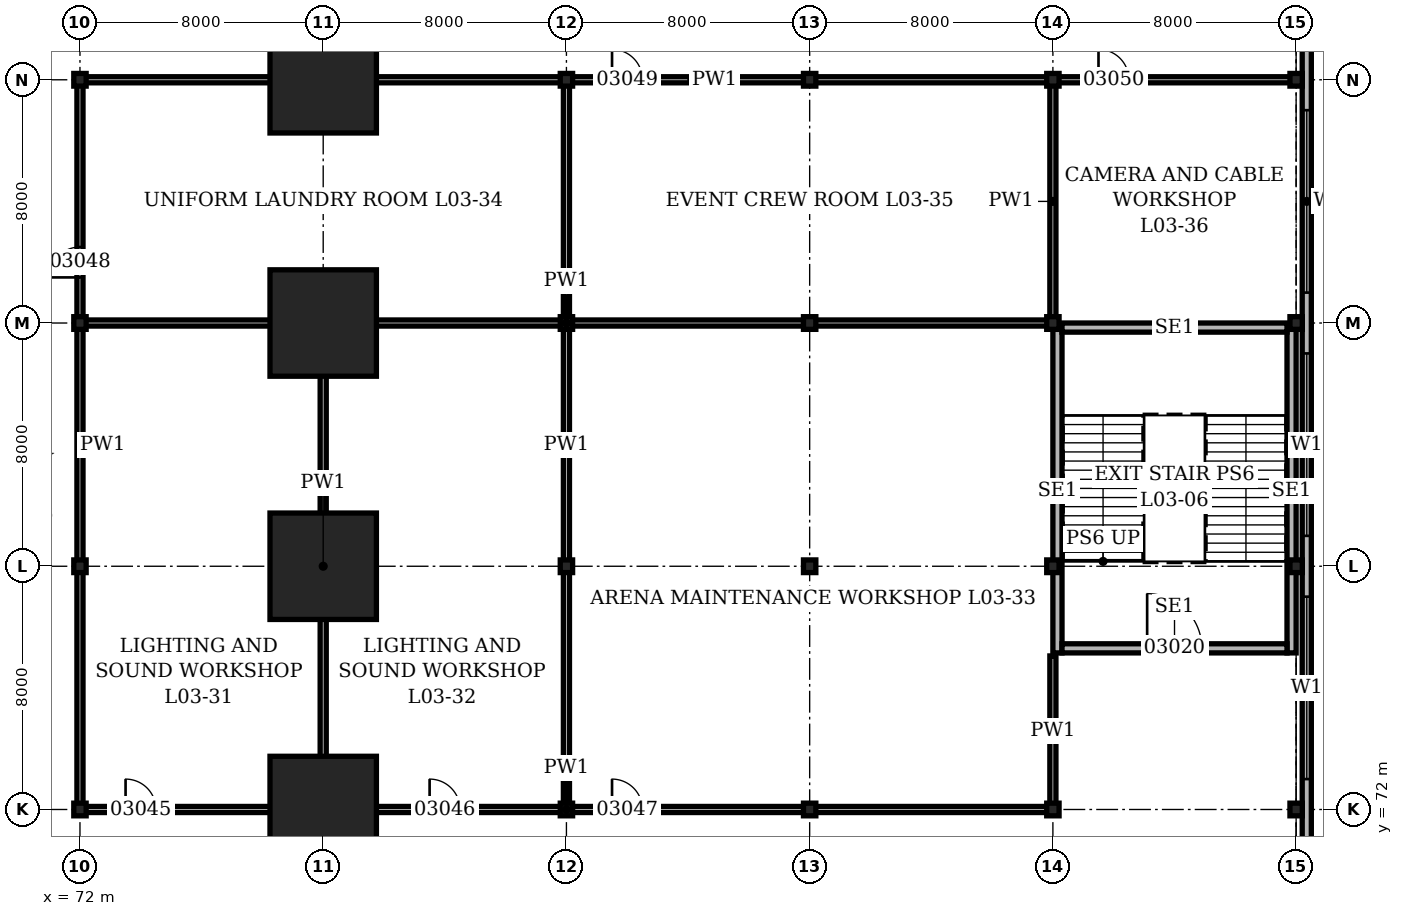
"""IFC4 building model, lengths in metres.
Left out: names, types, materials, properties, quantities, classifications, styles, units other than length and angle.
Written with IfcOpenShell. Run it as: python <this file> out.ifc"""

import sys

from ifc_helpers import new_model, si_unit, direction, frame, frame_2d, origin, origin_2d, place, context, subcontext, project, spatial, rectangle, hollow_rectangle, i_section, extrude, element, fill, save


model = new_model("IFC4")
c1 = context("Model", 3, precision=1e-05, world=origin(), true_north=direction((0.0, 1.0)))
c2 = subcontext(c1, "Body", "Model", "MODEL_VIEW")
j1 = project(units=[si_unit("LENGTHUNIT", "METRE"), si_unit("PLANEANGLEUNIT", "RADIAN")], contexts=[c1])
p1 = place(None, origin())
s1 = spatial("IfcSite", under=j1, at=p1, CompositionType="ELEMENT")
p2 = place(p1, origin())
s2 = spatial("IfcBuilding", under=s1, at=p2, CompositionType="ELEMENT")
p3 = place(p2, frame((0.0, 0.0, 14.9)))
s3 = spatial("IfcBuildingStorey", under=s2, at=p3, CompositionType="ELEMENT", Elevation=14.9)
for number, where, z_axis, x_axis in (
    (1, (72.0, 72.0, 0.0), (0.0, 0.0, 1.0), (1.0, 0.0, 0.0)),
    (2, (72.0, 80.0, 0.0), (0.0, 0.0, 1.0), (1.0, 0.0, 0.0)),
    (3, (72.0, 88.0, 0.0), (0.0, 0.0, 1.0), (1.0, 0.0, 0.0)),
    (4, (72.0, 96.0, 0.0), (0.0, 0.0, 1.0), (1.0, 0.0, 0.0)),
):
    element("IfcColumn", number, at=place(p3, frame(where, z_axis=z_axis, x_axis=x_axis)), inside=s3, PredefinedType="COLUMN", context=c2, shape_type="SweptSolid", body=[
        extrude(i_section(OverallWidth=0.406, OverallDepth=0.417, WebThickness=0.03, FlangeThickness=0.048, at=origin_2d()), origin(), (0.0, 0.0, 1.0), 5.0),
    ])
for number, where, z_axis, x_axis in (
    (5, (80.0, 72.0, 0.0), (0.0, 0.0, 1.0), (1.0, 0.0, 0.0)),
    (6, (80.0, 80.0, 0.0), (0.0, 0.0, 1.0), (1.0, 0.0, 0.0)),
    (7, (80.0, 88.0, 0.0), (0.0, 0.0, 1.0), (1.0, 0.0, 0.0)),
    (8, (80.0, 96.0, 0.0), (0.0, 0.0, 1.0), (1.0, 0.0, 0.0)),
):
    element("IfcColumn", number, at=place(p3, frame(where, z_axis=z_axis, x_axis=x_axis)), inside=s3, PredefinedType="COLUMN", context=c2, shape_type="SweptSolid", body=[
        extrude(hollow_rectangle(XDim=3.5, YDim=3.5, WallThickness=0.5, at=origin_2d()), origin(), (0.0, 0.0, 1.0), 5.0),
    ])
for number, where, z_axis, x_axis in (
    (9, (88.0, 72.0, 0.0), (0.0, 0.0, 1.0), (1.0, 0.0, 0.0)),
    (10, (88.0, 80.0, 0.0), (0.0, 0.0, 1.0), (1.0, 0.0, 0.0)),
    (11, (88.0, 88.0, 0.0), (0.0, 0.0, 1.0), (1.0, 0.0, 0.0)),
    (12, (88.0, 96.0, 0.0), (0.0, 0.0, 1.0), (1.0, 0.0, 0.0)),
    (13, (96.0, 72.0, 0.0), (0.0, 0.0, 1.0), (1.0, 0.0, 0.0)),
    (14, (96.0, 80.0, 0.0), (0.0, 0.0, 1.0), (1.0, 0.0, 0.0)),
    (15, (96.0, 88.0, 0.0), (0.0, 0.0, 1.0), (1.0, 0.0, 0.0)),
    (16, (96.0, 96.0, 0.0), (0.0, 0.0, 1.0), (1.0, 0.0, 0.0)),
    (17, (104.0, 72.0, 0.0), (0.0, 0.0, 1.0), (1.0, 0.0, 0.0)),
    (18, (104.0, 80.0, 0.0), (0.0, 0.0, 1.0), (1.0, 0.0, 0.0)),
    (19, (104.0, 88.0, 0.0), (0.0, 0.0, 1.0), (1.0, 0.0, 0.0)),
    (20, (104.0, 96.0, 0.0), (0.0, 0.0, 1.0), (1.0, 0.0, 0.0)),
    (21, (112.0, 72.0, 0.0), (0.0, 0.0, 1.0), (1.0, 0.0, 0.0)),
    (22, (112.0, 80.0, 0.0), (0.0, 0.0, 1.0), (1.0, 0.0, 0.0)),
    (23, (112.0, 88.0, 0.0), (0.0, 0.0, 1.0), (1.0, 0.0, 0.0)),
    (24, (112.0, 96.0, 0.0), (0.0, 0.0, 1.0), (1.0, 0.0, 0.0)),
):
    element("IfcColumn", number, at=place(p3, frame(where, z_axis=z_axis, x_axis=x_axis)), inside=s3, PredefinedType="COLUMN", context=c2, shape_type="SweptSolid", body=[
        extrude(i_section(OverallWidth=0.406, OverallDepth=0.417, WebThickness=0.03, FlangeThickness=0.048, at=origin_2d()), origin(), (0.0, 0.0, 1.0), 5.0),
    ])
p4 = place(p3, frame((112.35, -0.35, 0.0), z_axis=(0.0, 0.0, 1.0), x_axis=(0.0, 1.0, 0.0)))
e25 = element("IfcWall", 25, at=p4, inside=s3, PredefinedType="SOLIDWALL", context=c2, shape_type="SweptSolid", body=[
    extrude(rectangle(XDim=112.7, YDim=0.3, at=frame_2d((56.35, 0.0))), origin(), (0.0, 0.0, 1.0), 5.0),
])
p5 = place(p4, frame((1.35, 0.0, 1.0)))
e26 = element("IfcOpeningElement", 26, at=p5, cuts=e25, PredefinedType="OPENING", context=c2, shape_type="SweptSolid", body=[
    extrude(rectangle(XDim=6.0, YDim=1.5, at=frame_2d((3.0, 0.75))), frame((0.0, 0.16, 0.0), z_axis=(0.0, -1.0, 0.0), x_axis=(1.0, 0.0, 0.0)), (0.0, 0.0, 1.0), 0.32),
])
p6 = place(p4, frame((9.35, 0.0, 1.0)))
e27 = element("IfcOpeningElement", 27, at=p6, cuts=e25, PredefinedType="OPENING", context=c2, shape_type="SweptSolid", body=[
    extrude(rectangle(XDim=6.0, YDim=1.5, at=frame_2d((3.0, 0.75))), frame((0.0, 0.16, 0.0), z_axis=(0.0, -1.0, 0.0), x_axis=(1.0, 0.0, 0.0)), (0.0, 0.0, 1.0), 0.32),
])
p7 = place(p4, frame((17.35, 0.0, 1.0)))
e28 = element("IfcOpeningElement", 28, at=p7, cuts=e25, PredefinedType="OPENING", context=c2, shape_type="SweptSolid", body=[
    extrude(rectangle(XDim=6.0, YDim=1.5, at=frame_2d((3.0, 0.75))), frame((0.0, 0.16, 0.0), z_axis=(0.0, -1.0, 0.0), x_axis=(1.0, 0.0, 0.0)), (0.0, 0.0, 1.0), 0.32),
])
p8 = place(p4, frame((25.35, 0.0, 1.0)))
e29 = element("IfcOpeningElement", 29, at=p8, cuts=e25, PredefinedType="OPENING", context=c2, shape_type="SweptSolid", body=[
    extrude(rectangle(XDim=6.0, YDim=1.5, at=frame_2d((3.0, 0.75))), frame((0.0, 0.16, 0.0), z_axis=(0.0, -1.0, 0.0), x_axis=(1.0, 0.0, 0.0)), (0.0, 0.0, 1.0), 0.32),
])
p9 = place(p4, frame((33.35, 0.0, 1.0)))
e30 = element("IfcOpeningElement", 30, at=p9, cuts=e25, PredefinedType="OPENING", context=c2, shape_type="SweptSolid", body=[
    extrude(rectangle(XDim=6.0, YDim=1.5, at=frame_2d((3.0, 0.75))), frame((0.0, 0.16, 0.0), z_axis=(0.0, -1.0, 0.0), x_axis=(1.0, 0.0, 0.0)), (0.0, 0.0, 1.0), 0.32),
])
p10 = place(p4, frame((41.35, 0.0, 1.0)))
e31 = element("IfcOpeningElement", 31, at=p10, cuts=e25, PredefinedType="OPENING", context=c2, shape_type="SweptSolid", body=[
    extrude(rectangle(XDim=6.0, YDim=1.5, at=frame_2d((3.0, 0.75))), frame((0.0, 0.16, 0.0), z_axis=(0.0, -1.0, 0.0), x_axis=(1.0, 0.0, 0.0)), (0.0, 0.0, 1.0), 0.32),
])
p11 = place(p4, frame((49.35, 0.0, 1.0)))
e32 = element("IfcOpeningElement", 32, at=p11, cuts=e25, PredefinedType="OPENING", context=c2, shape_type="SweptSolid", body=[
    extrude(rectangle(XDim=6.0, YDim=1.5, at=frame_2d((3.0, 0.75))), frame((0.0, 0.16, 0.0), z_axis=(0.0, -1.0, 0.0), x_axis=(1.0, 0.0, 0.0)), (0.0, 0.0, 1.0), 0.32),
])
p12 = place(p4, frame((57.35, 0.0, 1.0)))
e33 = element("IfcOpeningElement", 33, at=p12, cuts=e25, PredefinedType="OPENING", context=c2, shape_type="SweptSolid", body=[
    extrude(rectangle(XDim=6.0, YDim=1.5, at=frame_2d((3.0, 0.75))), frame((0.0, 0.16, 0.0), z_axis=(0.0, -1.0, 0.0), x_axis=(1.0, 0.0, 0.0)), (0.0, 0.0, 1.0), 0.32),
])
p13 = place(p4, frame((65.35, 0.0, 1.0)))
e34 = element("IfcOpeningElement", 34, at=p13, cuts=e25, PredefinedType="OPENING", context=c2, shape_type="SweptSolid", body=[
    extrude(rectangle(XDim=6.0, YDim=1.5, at=frame_2d((3.0, 0.75))), frame((0.0, 0.16, 0.0), z_axis=(0.0, -1.0, 0.0), x_axis=(1.0, 0.0, 0.0)), (0.0, 0.0, 1.0), 0.32),
])
p14 = place(p4, frame((73.35, 0.0, 1.0)))
e35 = element("IfcOpeningElement", 35, at=p14, cuts=e25, PredefinedType="OPENING", context=c2, shape_type="SweptSolid", body=[
    extrude(rectangle(XDim=6.0, YDim=1.5, at=frame_2d((3.0, 0.75))), frame((0.0, 0.16, 0.0), z_axis=(0.0, -1.0, 0.0), x_axis=(1.0, 0.0, 0.0)), (0.0, 0.0, 1.0), 0.32),
])
p15 = place(p4, frame((81.35, 0.0, 1.0)))
e36 = element("IfcOpeningElement", 36, at=p15, cuts=e25, PredefinedType="OPENING", context=c2, shape_type="SweptSolid", body=[
    extrude(rectangle(XDim=6.0, YDim=1.5, at=frame_2d((3.0, 0.75))), frame((0.0, 0.16, 0.0), z_axis=(0.0, -1.0, 0.0), x_axis=(1.0, 0.0, 0.0)), (0.0, 0.0, 1.0), 0.32),
])
p16 = place(p4, frame((89.35, 0.0, 1.0)))
e37 = element("IfcOpeningElement", 37, at=p16, cuts=e25, PredefinedType="OPENING", context=c2, shape_type="SweptSolid", body=[
    extrude(rectangle(XDim=6.0, YDim=1.5, at=frame_2d((3.0, 0.75))), frame((0.0, 0.16, 0.0), z_axis=(0.0, -1.0, 0.0), x_axis=(1.0, 0.0, 0.0)), (0.0, 0.0, 1.0), 0.32),
])
p17 = place(p4, frame((97.35, 0.0, 1.0)))
e38 = element("IfcOpeningElement", 38, at=p17, cuts=e25, PredefinedType="OPENING", context=c2, shape_type="SweptSolid", body=[
    extrude(rectangle(XDim=6.0, YDim=1.5, at=frame_2d((3.0, 0.75))), frame((0.0, 0.16, 0.0), z_axis=(0.0, -1.0, 0.0), x_axis=(1.0, 0.0, 0.0)), (0.0, 0.0, 1.0), 0.32),
])
p18 = place(p4, frame((105.35, 0.0, 1.0)))
e39 = element("IfcOpeningElement", 39, at=p18, cuts=e25, PredefinedType="OPENING", context=c2, shape_type="SweptSolid", body=[
    extrude(rectangle(XDim=6.0, YDim=1.5, at=frame_2d((3.0, 0.75))), frame((0.0, 0.16, 0.0), z_axis=(0.0, -1.0, 0.0), x_axis=(1.0, 0.0, 0.0)), (0.0, 0.0, 1.0), 0.32),
])
for number, where, z_axis, x_axis in (
    (40, (104.15, 77.15, 0.0), (0.0, 0.0, 1.0), (0.0, 1.0, 0.0)),
    (41, (111.85, 77.15, 0.0), (0.0, 0.0, 1.0), (0.0, 1.0, 0.0)),
):
    element("IfcWall", number, at=place(p3, frame(where, z_axis=z_axis, x_axis=x_axis)), inside=s3, PredefinedType="SOLIDWALL", context=c2, shape_type="SweptSolid", body=[
        extrude(rectangle(XDim=10.642, YDim=0.3, at=frame_2d((5.321, 0.0))), origin(), (0.0, 0.0, 1.0), 4.8),
    ])
p19 = place(p3, frame((104.3, 77.3, 0.0), z_axis=(0.0, 0.0, 1.0), x_axis=(1.0, 0.0, 0.0)))
e42 = element("IfcWall", 42, at=p19, inside=s3, PredefinedType="SOLIDWALL", context=c2, shape_type="SweptSolid", body=[
    extrude(rectangle(XDim=7.4, YDim=0.3, at=frame_2d((3.7, 0.0))), origin(), (0.0, 0.0, 1.0), 4.8),
])
p20 = place(p19, frame((2.8, 0.0, 0.0)))
e43 = element("IfcOpeningElement", 43, at=p20, cuts=e42, PredefinedType="OPENING", context=c2, shape_type="SweptSolid", body=[
    extrude(rectangle(XDim=1.8, YDim=2.1, at=frame_2d((0.9, 1.05))), frame((0.0, 0.16, 0.0), z_axis=(0.0, -1.0, 0.0), x_axis=(1.0, 0.0, 0.0)), (0.0, 0.0, 1.0), 0.32),
])
p21 = place(p3, frame((104.3, 87.85, 0.0), z_axis=(0.0, 0.0, 1.0), x_axis=(1.0, 0.0, 0.0)))
e44 = element("IfcWall", 44, at=p21, inside=s3, PredefinedType="SOLIDWALL", context=c2, shape_type="SweptSolid", body=[
    extrude(rectangle(XDim=7.4, YDim=0.3, at=frame_2d((3.7, 0.0))), origin(), (0.0, 0.0, 1.0), 4.8),
])
p22 = place(p3, frame((72.1, 72.0, 0.0), z_axis=(0.0, 0.0, 1.0), x_axis=(1.0, 0.0, 0.0)))
e45 = element("IfcWall", 45, at=p22, inside=s3, PredefinedType="PARTITIONING", context=c2, shape_type="SweptSolid", body=[
    extrude(rectangle(XDim=31.8, YDim=0.2, at=frame_2d((15.9, 0.0))), origin(), (0.0, 0.0, 1.0), 4.028),
])
p23 = place(p22, frame((1.4, 0.0, 0.0)))
e46 = element("IfcOpeningElement", 46, at=p23, cuts=e45, PredefinedType="OPENING", context=c2, shape_type="SweptSolid", body=[
    extrude(rectangle(XDim=1.0, YDim=2.1, at=frame_2d((0.5, 1.05))), frame((0.0, 0.11, 0.0), z_axis=(0.0, -1.0, 0.0), x_axis=(1.0, 0.0, 0.0)), (0.0, 0.0, 1.0), 0.22),
])
p24 = place(p22, frame((11.4, 0.0, 0.0)))
e47 = element("IfcOpeningElement", 47, at=p24, cuts=e45, PredefinedType="OPENING", context=c2, shape_type="SweptSolid", body=[
    extrude(rectangle(XDim=1.0, YDim=2.1, at=frame_2d((0.5, 1.05))), frame((0.0, 0.11, 0.0), z_axis=(0.0, -1.0, 0.0), x_axis=(1.0, 0.0, 0.0)), (0.0, 0.0, 1.0), 0.22),
])
p25 = place(p22, frame((17.4, 0.0, 0.0)))
e48 = element("IfcOpeningElement", 48, at=p25, cuts=e45, PredefinedType="OPENING", context=c2, shape_type="SweptSolid", body=[
    extrude(rectangle(XDim=1.0, YDim=2.1, at=frame_2d((0.5, 1.05))), frame((0.0, 0.11, 0.0), z_axis=(0.0, -1.0, 0.0), x_axis=(1.0, 0.0, 0.0)), (0.0, 0.0, 1.0), 0.22),
])
p26 = place(p3, frame((72.1, 88.0, 0.0), z_axis=(0.0, 0.0, 1.0), x_axis=(1.0, 0.0, 0.0)))
e49 = element("IfcWall", 49, at=p26, inside=s3, PredefinedType="PARTITIONING", context=c2, shape_type="SweptSolid", body=[
    extrude(rectangle(XDim=31.8, YDim=0.2, at=frame_2d((15.9, 0.0))), origin(), (0.0, 0.0, 1.0), 4.028),
])
p27 = place(p3, frame((72.1, 96.0, 0.0), z_axis=(0.0, 0.0, 1.0), x_axis=(1.0, 0.0, 0.0)))
e50 = element("IfcWall", 50, at=p27, inside=s3, PredefinedType="PARTITIONING", context=c2, shape_type="SweptSolid", body=[
    extrude(rectangle(XDim=40.05, YDim=0.2, at=frame_2d((20.025, 0.0))), origin(), (0.0, 0.0, 1.0), 4.028),
])
p28 = place(p27, frame((17.4, 0.0, 0.0)))
e51 = element("IfcOpeningElement", 51, at=p28, cuts=e50, PredefinedType="OPENING", context=c2, shape_type="SweptSolid", body=[
    extrude(rectangle(XDim=1.0, YDim=2.1, at=frame_2d((0.5, 1.05))), frame((0.0, 0.11, 0.0), z_axis=(0.0, -1.0, 0.0), x_axis=(1.0, 0.0, 0.0)), (0.0, 0.0, 1.0), 0.22),
])
p29 = place(p27, frame((33.4, 0.0, 0.0)))
e52 = element("IfcOpeningElement", 52, at=p29, cuts=e50, PredefinedType="OPENING", context=c2, shape_type="SweptSolid", body=[
    extrude(rectangle(XDim=1.0, YDim=2.1, at=frame_2d((0.5, 1.05))), frame((0.0, 0.11, 0.0), z_axis=(0.0, -1.0, 0.0), x_axis=(1.0, 0.0, 0.0)), (0.0, 0.0, 1.0), 0.22),
])
p30 = place(p3, frame((72.0, 72.1, 0.0), z_axis=(0.0, 0.0, 1.0), x_axis=(0.0, 1.0, 0.0)))
e53 = element("IfcWall", 53, at=p30, inside=s3, PredefinedType="PARTITIONING", context=c2, shape_type="SweptSolid", body=[
    extrude(rectangle(XDim=23.8, YDim=0.2, at=frame_2d((11.9, 0.0))), origin(), (0.0, 0.0, 1.0), 4.028),
])
p31 = place(p30, frame((17.4, 0.0, 0.0)))
e54 = element("IfcOpeningElement", 54, at=p31, cuts=e53, PredefinedType="OPENING", context=c2, shape_type="SweptSolid", body=[
    extrude(rectangle(XDim=1.0, YDim=2.1, at=frame_2d((0.5, 1.05))), frame((0.0, 0.11, 0.0), z_axis=(0.0, -1.0, 0.0), x_axis=(1.0, 0.0, 0.0)), (0.0, 0.0, 1.0), 0.22),
])
p32 = place(p3, frame((80.0, 72.1, 0.0), z_axis=(0.0, 0.0, 1.0), x_axis=(0.0, 1.0, 0.0)))
e55 = element("IfcWall", 55, at=p32, inside=s3, PredefinedType="PARTITIONING", context=c2, shape_type="SweptSolid", body=[
    extrude(rectangle(XDim=15.8, YDim=0.2, at=frame_2d((7.9, 0.0))), origin(), (0.0, 0.0, 1.0), 4.028),
])
p33 = place(p3, frame((88.0, 72.1, 0.0), z_axis=(0.0, 0.0, 1.0), x_axis=(0.0, 1.0, 0.0)))
e56 = element("IfcWall", 56, at=p33, inside=s3, PredefinedType="PARTITIONING", context=c2, shape_type="SweptSolid", body=[
    extrude(rectangle(XDim=23.8, YDim=0.2, at=frame_2d((11.9, 0.0))), origin(), (0.0, 0.0, 1.0), 4.028),
])
p34 = place(p3, frame((104.0, 72.1, 0.0), z_axis=(0.0, 0.0, 1.0), x_axis=(0.0, 1.0, 0.0)))
e57 = element("IfcWall", 57, at=p34, inside=s3, PredefinedType="PARTITIONING", context=c2, shape_type="SweptSolid", body=[
    extrude(rectangle(XDim=4.95, YDim=0.2, at=frame_2d((2.475, 0.0))), origin(), (0.0, 0.0, 1.0), 4.028),
])
p35 = place(p3, frame((104.0, 88.1, 0.0), z_axis=(0.0, 0.0, 1.0), x_axis=(0.0, 1.0, 0.0)))
e58 = element("IfcWall", 58, at=p35, inside=s3, PredefinedType="PARTITIONING", context=c2, shape_type="SweptSolid", body=[
    extrude(rectangle(XDim=7.8, YDim=0.2, at=frame_2d((3.9, 0.0))), origin(), (0.0, 0.0, 1.0), 4.028),
])
p36 = place(p14, origin())
e59 = element("IfcWindow", 59, at=p36, inside=s3, PartitioningType="SINGLE_PANEL", PredefinedType="WINDOW", context=c2, shape_type="SweptSolid", body=[
    extrude(rectangle(XDim=6.0, YDim=1.5, at=frame_2d((3.0, 0.75))), frame((0.0, 0.03, 0.0), z_axis=(0.0, -1.0, 0.0), x_axis=(1.0, 0.0, 0.0)), (0.0, 0.0, 1.0), 0.06),
])
fill(e35, e59)
p37 = place(p15, origin())
e60 = element("IfcWindow", 60, at=p37, inside=s3, PartitioningType="SINGLE_PANEL", PredefinedType="WINDOW", context=c2, shape_type="SweptSolid", body=[
    extrude(rectangle(XDim=6.0, YDim=1.5, at=frame_2d((3.0, 0.75))), frame((0.0, 0.03, 0.0), z_axis=(0.0, -1.0, 0.0), x_axis=(1.0, 0.0, 0.0)), (0.0, 0.0, 1.0), 0.06),
])
fill(e36, e60)
p38 = place(p16, origin())
e61 = element("IfcWindow", 61, at=p38, inside=s3, PartitioningType="SINGLE_PANEL", PredefinedType="WINDOW", context=c2, shape_type="SweptSolid", body=[
    extrude(rectangle(XDim=6.0, YDim=1.5, at=frame_2d((3.0, 0.75))), frame((0.0, 0.03, 0.0), z_axis=(0.0, -1.0, 0.0), x_axis=(1.0, 0.0, 0.0)), (0.0, 0.0, 1.0), 0.06),
])
fill(e37, e61)
p39 = place(p20, origin())
e62 = element("IfcDoor", 62, at=p39, inside=s3, OperationType="DOUBLE_DOOR_SINGLE_SWING", PredefinedType="DOOR", context=c2, shape_type="SweptSolid", body=[
    extrude(rectangle(XDim=1.8, YDim=2.1, at=frame_2d((0.9, 1.05))), frame((0.0, 0.15, 0.0), z_axis=(0.0, -1.0, 0.0), x_axis=(1.0, 0.0, 0.0)), (0.0, 0.0, 1.0), 0.3),
])
fill(e43, e62)
p40 = place(p23, origin())
e63 = element("IfcDoor", 63, at=p40, inside=s3, OperationType="SINGLE_SWING_LEFT", PredefinedType="DOOR", context=c2, shape_type="SweptSolid", body=[
    extrude(rectangle(XDim=1.0, YDim=2.1, at=frame_2d((0.5, 1.05))), frame((0.0, 0.1, 0.0), z_axis=(0.0, -1.0, 0.0), x_axis=(1.0, 0.0, 0.0)), (0.0, 0.0, 1.0), 0.199),
])
fill(e46, e63)
p41 = place(p24, origin())
e64 = element("IfcDoor", 64, at=p41, inside=s3, OperationType="SINGLE_SWING_LEFT", PredefinedType="DOOR", context=c2, shape_type="SweptSolid", body=[
    extrude(rectangle(XDim=1.0, YDim=2.1, at=frame_2d((0.5, 1.05))), frame((0.0, 0.1, 0.0), z_axis=(0.0, -1.0, 0.0), x_axis=(1.0, 0.0, 0.0)), (0.0, 0.0, 1.0), 0.199),
])
fill(e47, e64)
p42 = place(p25, origin())
e65 = element("IfcDoor", 65, at=p42, inside=s3, OperationType="SINGLE_SWING_LEFT", PredefinedType="DOOR", context=c2, shape_type="SweptSolid", body=[
    extrude(rectangle(XDim=1.0, YDim=2.1, at=frame_2d((0.5, 1.05))), frame((0.0, 0.1, 0.0), z_axis=(0.0, -1.0, 0.0), x_axis=(1.0, 0.0, 0.0)), (0.0, 0.0, 1.0), 0.199),
])
fill(e48, e65)
p43 = place(p31, origin())
e66 = element("IfcDoor", 66, at=p43, inside=s3, OperationType="SINGLE_SWING_LEFT", PredefinedType="DOOR", context=c2, shape_type="SweptSolid", body=[
    extrude(rectangle(XDim=1.0, YDim=2.1, at=frame_2d((0.5, 1.05))), frame((0.0, 0.1, 0.0), z_axis=(0.0, -1.0, 0.0), x_axis=(1.0, 0.0, 0.0)), (0.0, 0.0, 1.0), 0.199),
])
fill(e54, e66)
p44 = place(p28, origin())
e67 = element("IfcDoor", 67, at=p44, inside=s3, OperationType="SINGLE_SWING_LEFT", PredefinedType="DOOR", context=c2, shape_type="SweptSolid", body=[
    extrude(rectangle(XDim=1.0, YDim=2.1, at=frame_2d((0.5, 1.05))), frame((0.0, 0.1, 0.0), z_axis=(0.0, -1.0, 0.0), x_axis=(1.0, 0.0, 0.0)), (0.0, 0.0, 1.0), 0.199),
])
fill(e51, e67)
p45 = place(p29, origin())
e68 = element("IfcDoor", 68, at=p45, inside=s3, OperationType="SINGLE_SWING_LEFT", PredefinedType="DOOR", context=c2, shape_type="SweptSolid", body=[
    extrude(rectangle(XDim=1.0, YDim=2.1, at=frame_2d((0.5, 1.05))), frame((0.0, 0.1, 0.0), z_axis=(0.0, -1.0, 0.0), x_axis=(1.0, 0.0, 0.0)), (0.0, 0.0, 1.0), 0.199),
])
fill(e52, e68)
save(model, sys.argv[1])
